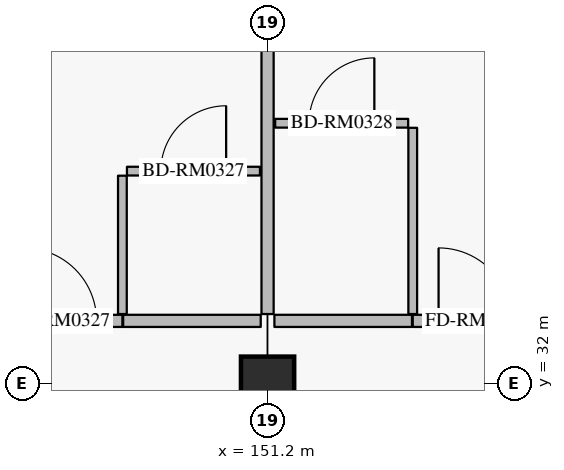
"""IFC4 building model, lengths in metres.
Left out: names, types, materials, properties, quantities, classifications, styles, units other than length and angle.
Written with IfcOpenShell. Run it as: python <this file> out.ifc"""

import sys

from ifc_helpers import new_model, si_unit, direction, frame, frame_2d, origin, origin_2d, place, context, subcontext, project, spatial, rectangle, extrude, element, fill, save


model = new_model("IFC4")
c1 = context("Model", 3, precision=1e-05, world=origin(), true_north=direction((0.0, 1.0)))
c2 = subcontext(c1, "Body", "Model", "MODEL_VIEW")
j1 = project(units=[si_unit("LENGTHUNIT", "METRE"), si_unit("PLANEANGLEUNIT", "RADIAN")], contexts=[c1])
p1 = place(None, origin())
s1 = spatial("IfcSite", under=j1, at=p1, CompositionType="ELEMENT")
p2 = place(p1, origin())
s2 = spatial("IfcBuilding", under=s1, at=p2, CompositionType="ELEMENT")
p3 = place(p2, frame((0.0, 0.0, 11.4)))
s3 = spatial("IfcBuildingStorey", under=s2, at=p3, CompositionType="ELEMENT", Elevation=11.4)
p4 = place(p3, frame((151.2, 32.0, 0.0), z_axis=(0.0, 0.0, 1.0), x_axis=(1.0, 0.0, 0.0)))
e1 = element("IfcColumn", 1, at=p4, inside=s3, PredefinedType="COLUMN", context=c2, shape_type="SweptSolid", body=[
    extrude(rectangle(XDim=0.7, YDim=0.7, at=origin_2d()), origin(), (0.0, 0.0, 1.0), 4.8),
])
p5 = place(p3, frame((143.2, 32.381, 0.0), z_axis=(0.0, 0.0, 1.0), x_axis=(0.724156739794, 0.689635422677, 0.0)))
e2 = element("IfcWall", 2, at=p5, inside=s3, PredefinedType="SOLIDWALL", context=c2, shape_type="SweptSolid", body=[
    extrude(rectangle(XDim=10.495, YDim=0.24, at=frame_2d((5.248, 0.0))), origin(), (0.0, 0.0, 1.0), 4.13),
])
p6 = place(p5, frame((2.701, 0.0, 0.8)))
e3 = element("IfcOpeningElement", 3, at=p6, cuts=e2, PredefinedType="OPENING", context=c2, shape_type="SweptSolid", body=[
    extrude(rectangle(XDim=1.6, YDim=1.6, at=frame_2d((0.8, 0.8))), frame((0.0, 0.13, 0.0), z_axis=(0.0, -1.0, 0.0), x_axis=(1.0, 0.0, 0.0)), (0.0, 0.0, 1.0), 0.26),
])
p7 = place(p5, frame((7.527, 0.0, 0.8)))
e4 = element("IfcOpeningElement", 4, at=p7, cuts=e2, PredefinedType="OPENING", context=c2, shape_type="SweptSolid", body=[
    extrude(rectangle(XDim=1.6, YDim=1.6, at=frame_2d((0.8, 0.8))), frame((0.0, 0.13, 0.0), z_axis=(0.0, -1.0, 0.0), x_axis=(1.0, 0.0, 0.0)), (0.0, 0.0, 1.0), 0.26),
])
p8 = place(p3, frame((147.65, 32.82, 0.0), z_axis=(0.0, 0.0, 1.0), x_axis=(1.0, 0.0, 0.0)))
e5 = element("IfcWall", 5, at=p8, inside=s3, PredefinedType="PARTITIONING", context=c2, shape_type="SweptSolid", body=[
    extrude(rectangle(XDim=1.64, YDim=0.16, at=frame_2d((0.82, 0.0))), origin(), (0.0, 0.0, 1.0), 4.535),
])
p9 = place(p8, frame((0.34, 0.0, 0.0)))
e6 = element("IfcOpeningElement", 6, at=p9, cuts=e5, PredefinedType="OPENING", context=c2, shape_type="SweptSolid", body=[
    extrude(rectangle(XDim=0.96, YDim=2.2, at=frame_2d((0.48, 1.1))), frame((0.0, 0.09, 0.0), z_axis=(0.0, -1.0, 0.0), x_axis=(1.0, 0.0, 0.0)), (0.0, 0.0, 1.0), 0.18),
])
p10 = place(p3, frame((149.3, 32.82, 0.0), z_axis=(0.0, 0.0, 1.0), x_axis=(1.0, 0.0, 0.0)))
e7 = element("IfcWall", 7, at=p10, inside=s3, PredefinedType="PARTITIONING", context=c2, shape_type="SweptSolid", body=[
    extrude(rectangle(XDim=1.81, YDim=0.16, at=frame_2d((0.905, 0.0))), origin(), (0.0, 0.0, 1.0), 4.535),
])
p11 = place(p3, frame((149.29, 32.91, 0.0), z_axis=(0.0, 0.0, 1.0), x_axis=(0.0, 1.0, 0.0)))
e8 = element("IfcWall", 8, at=p11, inside=s3, PredefinedType="PARTITIONING", context=c2, shape_type="SweptSolid", body=[
    extrude(rectangle(XDim=1.82, YDim=0.115, at=frame_2d((0.91, 0.0))), origin(), (0.0, 0.0, 1.0), 4.535),
])
p12 = place(p3, frame((149.35, 34.79, 0.0), z_axis=(0.0, 0.0, 1.0), x_axis=(1.0, 0.0, 0.0)))
e9 = element("IfcWall", 9, at=p12, inside=s3, PredefinedType="PARTITIONING", context=c2, shape_type="SweptSolid", body=[
    extrude(rectangle(XDim=1.75, YDim=0.115, at=frame_2d((0.875, 0.0))), origin(), (0.0, 0.0, 1.0), 4.535),
])
p13 = place(p12, frame((0.445, 0.0, 0.0)))
e10 = element("IfcOpeningElement", 10, at=p13, cuts=e9, PredefinedType="OPENING", context=c2, shape_type="SweptSolid", body=[
    extrude(rectangle(XDim=0.86, YDim=2.12, at=frame_2d((0.43, 1.06))), frame((0.0, 0.067, 0.0), z_axis=(0.0, -1.0, 0.0), x_axis=(1.0, 0.0, 0.0)), (0.0, 0.0, 1.0), 0.135),
])
p14 = place(p3, frame((151.29, 32.82, 0.0), z_axis=(0.0, 0.0, 1.0), x_axis=(1.0, 0.0, 0.0)))
e11 = element("IfcWall", 11, at=p14, inside=s3, PredefinedType="PARTITIONING", context=c2, shape_type="SweptSolid", body=[
    extrude(rectangle(XDim=1.81, YDim=0.16, at=frame_2d((0.905, 0.0))), origin(), (0.0, 0.0, 1.0), 4.535),
])
p15 = place(p3, frame((153.11, 32.82, 0.0), z_axis=(0.0, 0.0, 1.0), x_axis=(1.0, 0.0, 0.0)))
e12 = element("IfcWall", 12, at=p15, inside=s3, PredefinedType="PARTITIONING", context=c2, shape_type="SweptSolid", body=[
    extrude(rectangle(XDim=1.64, YDim=0.16, at=frame_2d((0.82, 0.0))), origin(), (0.0, 0.0, 1.0), 4.535),
])
p16 = place(p15, frame((0.34, 0.0, 0.0)))
e13 = element("IfcOpeningElement", 13, at=p16, cuts=e12, PredefinedType="OPENING", context=c2, shape_type="SweptSolid", body=[
    extrude(rectangle(XDim=0.96, YDim=2.2, at=frame_2d((0.48, 1.1))), frame((0.0, 0.09, 0.0), z_axis=(0.0, -1.0, 0.0), x_axis=(1.0, 0.0, 0.0)), (0.0, 0.0, 1.0), 0.18),
])
p17 = place(p3, frame((153.11, 32.91, 0.0), z_axis=(0.0, 0.0, 1.0), x_axis=(0.0, 1.0, 0.0)))
e14 = element("IfcWall", 14, at=p17, inside=s3, PredefinedType="PARTITIONING", context=c2, shape_type="SweptSolid", body=[
    extrude(rectangle(XDim=2.45, YDim=0.115, at=frame_2d((1.225, 0.0))), origin(), (0.0, 0.0, 1.0), 4.535),
])
p18 = place(p3, frame((151.3, 35.42, 0.0), z_axis=(0.0, 0.0, 1.0), x_axis=(1.0, 0.0, 0.0)))
e15 = element("IfcWall", 15, at=p18, inside=s3, PredefinedType="PARTITIONING", context=c2, shape_type="SweptSolid", body=[
    extrude(rectangle(XDim=1.75, YDim=0.115, at=frame_2d((0.875, 0.0))), origin(), (0.0, 0.0, 1.0), 4.535),
])
p19 = place(p18, frame((0.445, 0.0, 0.0)))
e16 = element("IfcOpeningElement", 16, at=p19, cuts=e15, PredefinedType="OPENING", context=c2, shape_type="SweptSolid", body=[
    extrude(rectangle(XDim=0.86, YDim=2.12, at=frame_2d((0.43, 1.06))), frame((0.0, 0.067, 0.0), z_axis=(0.0, -1.0, 0.0), x_axis=(1.0, 0.0, 0.0)), (0.0, 0.0, 1.0), 0.135),
])
p20 = place(p3, frame((151.2, 32.91, 0.0), z_axis=(0.0, 0.0, 1.0), x_axis=(0.0, 1.0, 0.0)))
e17 = element("IfcWall", 17, at=p20, inside=s3, PredefinedType="PARTITIONING", context=c2, shape_type="SweptSolid", body=[
    extrude(rectangle(XDim=6.75, YDim=0.16, at=frame_2d((3.375, 0.0))), origin(), (0.0, 0.0, 1.0), 3.98),
])
p21 = place(p9, origin())
e18 = element("IfcDoor", 18, at=p21, inside=s3, OperationType="SINGLE_SWING_LEFT", PredefinedType="DOOR", context=c2, shape_type="SweptSolid", body=[
    extrude(rectangle(XDim=0.96, YDim=2.2, at=frame_2d((0.48, 1.1))), frame((0.0, 0.025, 0.0), z_axis=(0.0, -1.0, 0.0), x_axis=(1.0, 0.0, 0.0)), (0.0, 0.0, 1.0), 0.05),
])
fill(e6, e18)
p22 = place(p13, origin())
e19 = element("IfcDoor", 19, at=p22, inside=s3, OperationType="SINGLE_SWING_RIGHT", PredefinedType="DOOR", context=c2, shape_type="SweptSolid", body=[
    extrude(rectangle(XDim=0.86, YDim=2.12, at=frame_2d((0.43, 1.06))), frame((0.0, 0.025, 0.0), z_axis=(0.0, -1.0, 0.0), x_axis=(1.0, 0.0, 0.0)), (0.0, 0.0, 1.0), 0.05),
])
fill(e10, e19)
p23 = place(p16, origin())
e20 = element("IfcDoor", 20, at=p23, inside=s3, OperationType="SINGLE_SWING_LEFT", PredefinedType="DOOR", context=c2, shape_type="SweptSolid", body=[
    extrude(rectangle(XDim=0.96, YDim=2.2, at=frame_2d((0.48, 1.1))), frame((0.0, 0.025, 0.0), z_axis=(0.0, -1.0, 0.0), x_axis=(1.0, 0.0, 0.0)), (0.0, 0.0, 1.0), 0.05),
])
fill(e13, e20)
p24 = place(p19, origin())
e21 = element("IfcDoor", 21, at=p24, inside=s3, OperationType="SINGLE_SWING_RIGHT", PredefinedType="DOOR", context=c2, shape_type="SweptSolid", body=[
    extrude(rectangle(XDim=0.86, YDim=2.12, at=frame_2d((0.43, 1.06))), frame((0.0, 0.025, 0.0), z_axis=(0.0, -1.0, 0.0), x_axis=(1.0, 0.0, 0.0)), (0.0, 0.0, 1.0), 0.05),
])
fill(e16, e21)
save(model, sys.argv[1])
